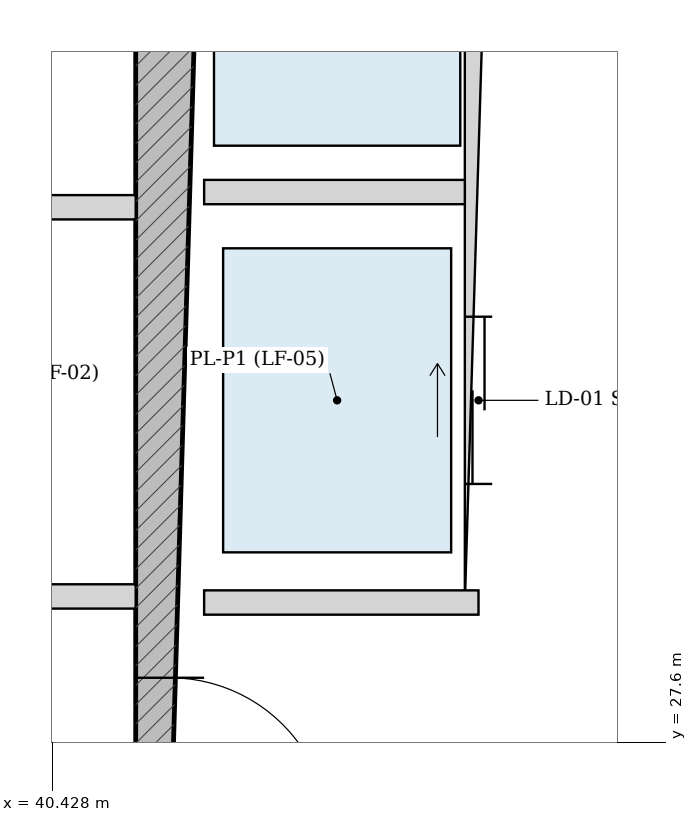
"""IFC4 building model, lengths in metres.
Left out: names, types, materials, properties, quantities, classifications, styles, units other than length and angle.
Written with IfcOpenShell. Run it as: python <this file> out.ifc"""

import sys

from ifc_helpers import new_model, si_unit, direction, frame, frame_2d, origin, place, context, subcontext, project, spatial, rectangle, extrude, source, transform, mapped, element, fill, save


model = new_model("IFC4")
c1 = context("Model", 3, precision=1e-05, world=origin(), true_north=direction((-0.2419218956, 0.970295726276)))
c2 = subcontext(c1, "Body", "Model", "MODEL_VIEW")
j1 = project(units=[si_unit("LENGTHUNIT", "METRE"), si_unit("PLANEANGLEUNIT", "RADIAN")], contexts=[c1])
p1 = place(None, origin())
s1 = spatial("IfcSite", under=j1, at=p1, CompositionType="ELEMENT")
p2 = place(p1, origin())
s2 = spatial("IfcBuilding", under=s1, at=p2, CompositionType="ELEMENT")
p3 = place(p2, frame((0.0, 0.0, 5.4)))
s3 = spatial("IfcBuildingStorey", under=s2, at=p3, CompositionType="ELEMENT", Elevation=5.4)
p4 = place(p3, frame((41.2, 19.175, 0.0), z_axis=(0.0, 0.0, 1.0), x_axis=(0.0, 1.0, 0.0)))
e1 = element("IfcWall", 1, at=p4, inside=s3, PredefinedType="SHEAR", context=c2, shape_type="SweptSolid", body=[
    extrude(rectangle(XDim=15.25, YDim=0.45, at=frame_2d((7.625, 0.0))), origin(), (0.0, 0.0, 1.0), 4.2),
])
p5 = place(p4, frame((7.8, 0.0, 0.0)))
e2 = element("IfcOpeningElement", 2, at=p5, cuts=e1, PredefinedType="OPENING", context=c2, shape_type="SweptSolid", body=[
    extrude(rectangle(XDim=1.05, YDim=2.15, at=frame_2d((0.525, 1.075))), frame((0.0, 0.235, 0.0), z_axis=(0.0, -1.0, 0.0), x_axis=(1.0, 0.0, 0.0)), (0.0, 0.0, 1.0), 0.47),
])
p6 = place(p3, frame((43.23, 28.52, 0.0), z_axis=(0.0, 0.0, 1.0), x_axis=(0.0, 1.0, 0.0)))
e3 = element("IfcWall", 3, at=p6, inside=s3, PredefinedType="PARTITIONING", context=c2, shape_type="SweptSolid", body=[
    extrude(rectangle(XDim=5.905, YDim=0.18, at=frame_2d((2.953, 0.0))), origin(), (0.0, 0.0, 1.0), 4.2),
])
p7 = place(p6, frame((3.655, 0.0, 0.0)))
e4 = element("IfcOpeningElement", 4, at=p7, cuts=e3, PredefinedType="OPENING", context=c2, shape_type="SweptSolid", body=[
    extrude(rectangle(XDim=1.15, YDim=2.2, at=frame_2d((0.575, 1.1))), frame((0.0, 0.1, 0.0), z_axis=(0.0, -1.0, 0.0), x_axis=(1.0, 0.0, 0.0)), (0.0, 0.0, 1.0), 0.2),
])
p8 = place(p6, frame((0.78, 0.0, 0.0)))
e5 = element("IfcOpeningElement", 5, at=p8, cuts=e3, PredefinedType="OPENING", context=c2, shape_type="SweptSolid", body=[
    extrude(rectangle(XDim=1.1, YDim=2.2, at=frame_2d((0.55, 1.1))), frame((0.0, 0.1, 0.0), z_axis=(0.0, -1.0, 0.0), x_axis=(1.0, 0.0, 0.0)), (0.0, 0.0, 1.0), 0.2),
])
p9 = place(p3, frame((41.425, 31.22, 0.0), z_axis=(0.0, 0.0, 1.0), x_axis=(1.0, 0.0, 0.0)))
e6 = element("IfcWall", 6, at=p9, inside=s3, PredefinedType="PARTITIONING", context=c2, shape_type="SweptSolid", body=[
    extrude(rectangle(XDim=1.715, YDim=0.16, at=frame_2d((0.857, 0.0))), origin(), (0.0, 0.0, 1.0), 4.2),
])
p10 = place(p3, frame((41.425, 28.52, 0.0), z_axis=(0.0, 0.0, 1.0), x_axis=(1.0, 0.0, 0.0)))
e7 = element("IfcWall", 7, at=p10, inside=s3, PredefinedType="PARTITIONING", context=c2, shape_type="SweptSolid", body=[
    extrude(rectangle(XDim=1.805, YDim=0.16, at=frame_2d((0.902, 0.0))), origin(), (0.0, 0.0, 1.0), 4.2),
])
p11 = place(p3, frame((35.025, 28.56, 0.0), z_axis=(0.0, 0.0, 1.0), x_axis=(1.0, 0.0, 0.0)))
e8 = element("IfcWall", 8, at=p11, inside=s3, PredefinedType="PARTITIONING", context=c2, shape_type="SweptSolid", body=[
    extrude(rectangle(XDim=5.95, YDim=0.16, at=frame_2d((2.975, 0.0))), origin(), (0.0, 0.0, 1.0), 4.2),
])
p12 = place(p11, frame((0.76, 0.0, 0.0)))
e9 = element("IfcOpeningElement", 9, at=p12, cuts=e8, PredefinedType="OPENING", context=c2, shape_type="SweptSolid", body=[
    extrude(rectangle(XDim=1.1, YDim=2.2, at=frame_2d((0.55, 1.1))), frame((0.0, 0.09, 0.0), z_axis=(0.0, -1.0, 0.0), x_axis=(1.0, 0.0, 0.0)), (0.0, 0.0, 1.0), 0.18),
])
p13 = place(p11, frame((2.425, 0.0, 0.0)))
e10 = element("IfcOpeningElement", 10, at=p13, cuts=e8, PredefinedType="OPENING", context=c2, shape_type="SweptSolid", body=[
    extrude(rectangle(XDim=1.1, YDim=2.2, at=frame_2d((0.55, 1.1))), frame((0.0, 0.09, 0.0), z_axis=(0.0, -1.0, 0.0), x_axis=(1.0, 0.0, 0.0)), (0.0, 0.0, 1.0), 0.18),
])
p14 = place(p11, frame((4.09, 0.0, 0.0)))
e11 = element("IfcOpeningElement", 11, at=p14, cuts=e8, PredefinedType="OPENING", context=c2, shape_type="SweptSolid", body=[
    extrude(rectangle(XDim=1.1, YDim=2.2, at=frame_2d((0.55, 1.1))), frame((0.0, 0.09, 0.0), z_axis=(0.0, -1.0, 0.0), x_axis=(1.0, 0.0, 0.0)), (0.0, 0.0, 1.0), 0.18),
])
p15 = place(p3, frame((35.025, 31.12, 0.0), z_axis=(0.0, 0.0, 1.0), x_axis=(1.0, 0.0, 0.0)))
e12 = element("IfcWall", 12, at=p15, inside=s3, PredefinedType="PARTITIONING", context=c2, shape_type="SweptSolid", body=[
    extrude(rectangle(XDim=5.95, YDim=0.16, at=frame_2d((2.975, 0.0))), origin(), (0.0, 0.0, 1.0), 4.2),
])
m1 = source(origin(), c2, "Body", "SweptSolid", [
    extrude(rectangle(XDim=1.05, YDim=2.15, at=frame_2d((0.525, 1.075))), frame((0.0, 0.025, 0.0), z_axis=(0.0, -1.0, 0.0), x_axis=(1.0, 0.0, 0.0)), (0.0, 0.0, 1.0), 0.05),
])
p16 = place(p5, frame((1.05, 0.0, 0.0), z_axis=(0.0, 0.0, 1.0), x_axis=(-1.0, 0.0, 0.0)))
e13 = element("IfcDoor", 13, at=p16, inside=s3, OperationType="SINGLE_SWING_RIGHT", PredefinedType="DOOR", context=c2, shape_type="MappedRepresentation", body=[
    mapped(m1, transform((0.0, 0.0, 0.0), scale=1.0)),
])
fill(e2, e13)
m2 = source(origin(), c2, "Body", "SweptSolid", [
    extrude(rectangle(XDim=1.1, YDim=2.2, at=frame_2d((0.55, 1.1))), frame((0.0, 0.025, 0.0), z_axis=(0.0, -1.0, 0.0), x_axis=(1.0, 0.0, 0.0)), (0.0, 0.0, 1.0), 0.05),
])
p17 = place(p8, origin())
e14 = element("IfcDoor", 14, at=p17, inside=s3, OperationType="DOUBLE_DOOR_SLIDING", PredefinedType="DOOR", context=c2, shape_type="MappedRepresentation", body=[
    mapped(m2, transform((0.0, 0.0, 0.0), scale=1.0)),
])
fill(e5, e14)
save(model, sys.argv[1])
